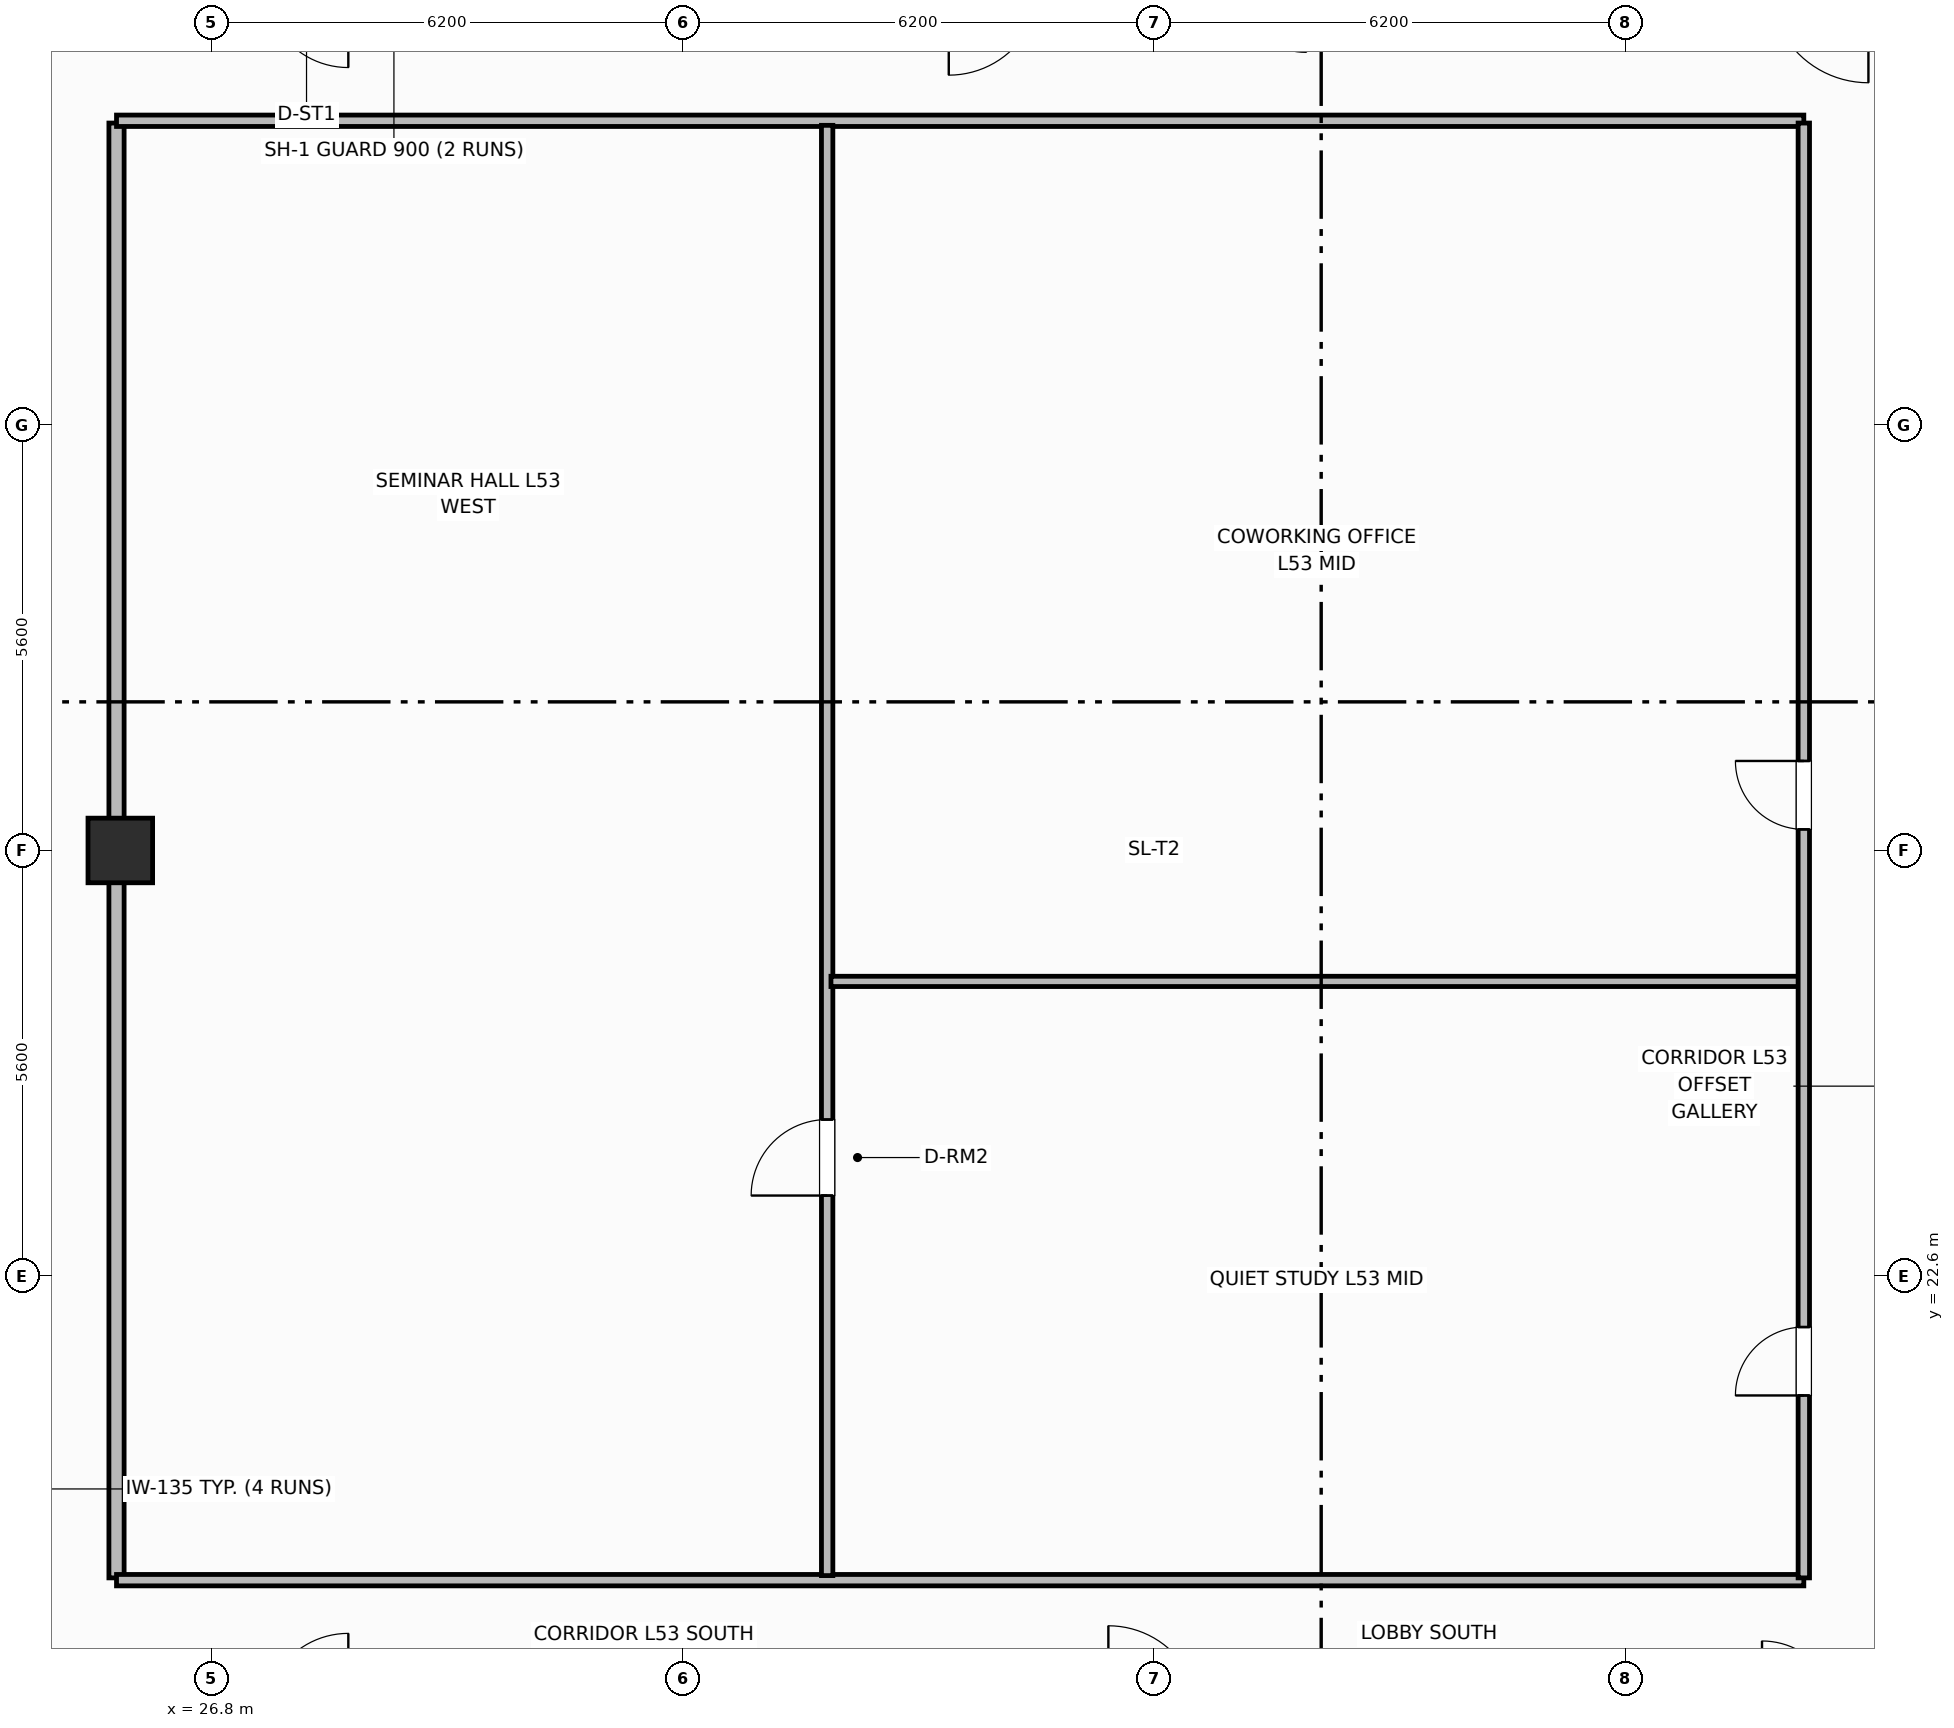
"""IFC4 building model, lengths in metres.
Left out: names, types, materials, properties, quantities, classifications, styles, units other than length and angle.
Written with IfcOpenShell. Run it as: python <this file> out.ifc"""

import sys

from ifc_helpers import new_model, si_unit, direction, frame, frame_2d, origin, origin_2d, place, context, subcontext, project, spatial, rectangle, extrude, element, fill, save


model = new_model("IFC4")
c1 = context("Model", 3, precision=1e-05, world=origin(), true_north=direction((0.0, 1.0)))
c2 = subcontext(c1, "Body", "Model", "MODEL_VIEW")
j1 = project(units=[si_unit("LENGTHUNIT", "METRE"), si_unit("PLANEANGLEUNIT", "RADIAN")], contexts=[c1])
p1 = place(None, origin())
s1 = spatial("IfcSite", under=j1, at=p1, CompositionType="ELEMENT")
p2 = place(p1, origin())
s2 = spatial("IfcBuilding", under=s1, at=p2, CompositionType="ELEMENT")
p3 = place(p2, frame((0.0, 0.0, 214.7)))
s3 = spatial("IfcBuildingStorey", under=s2, at=p3, CompositionType="ELEMENT", Elevation=214.7)
p4 = place(p3, frame((25.6, 28.2, 0.0), z_axis=(0.0, 0.0, 1.0), x_axis=(1.0, 0.0, 0.0)))
e1 = element("IfcColumn", 1, at=p4, inside=s3, PredefinedType="COLUMN", context=c2, shape_type="SweptSolid", body=[
    extrude(rectangle(XDim=0.85, YDim=0.85, at=origin_2d()), origin(), (0.0, 0.0, 1.0), 3.7),
])
p5 = place(p3, frame((25.55, 18.63, 0.0), z_axis=(0.0, 0.0, 1.0), x_axis=(0.0, 1.0, 0.0)))
e2 = element("IfcWall", 2, at=p5, inside=s3, PredefinedType="PARTITIONING", context=c2, shape_type="SweptSolid", body=[
    extrude(rectangle(XDim=19.14, YDim=0.2, at=frame_2d((9.57, 0.0))), origin(), (0.0, 0.0, 1.0), 2.55),
])
for number, where, z_axis, x_axis in (
    (3, (25.55, 18.6, 0.0), (0.0, 0.0, 1.0), (1.0, 0.0, 0.0)),
    (4, (25.55, 37.8, 0.0), (0.0, 0.0, 1.0), (1.0, 0.0, 0.0)),
):
    element("IfcWall", number, at=place(p3, frame(where, z_axis=z_axis, x_axis=x_axis)), inside=s3, PredefinedType="PARTITIONING", context=c2, shape_type="SweptSolid", body=[
        extrude(rectangle(XDim=22.2, YDim=0.15, at=frame_2d((11.1, 0.0))), origin(), (0.0, 0.0, 1.0), 2.55),
    ])
p6 = place(p3, frame((34.9, 18.66, 0.0), z_axis=(0.0, 0.0, 1.0), x_axis=(0.0, 1.0, 0.0)))
e5 = element("IfcWall", 5, at=p6, inside=s3, PredefinedType="PARTITIONING", context=c2, shape_type="SweptSolid", body=[
    extrude(rectangle(XDim=19.08, YDim=0.15, at=frame_2d((9.54, 0.0))), origin(), (0.0, 0.0, 1.0), 2.55),
])
p7 = place(p6, frame((5.0, 0.0, 0.0)))
e6 = element("IfcOpeningElement", 6, at=p7, cuts=e5, PredefinedType="OPENING", context=c2, shape_type="SweptSolid", body=[
    extrude(rectangle(XDim=1.0, YDim=2.15, at=frame_2d((0.5, 1.075))), frame((0.0, 0.085, 0.0), z_axis=(0.0, -1.0, 0.0), x_axis=(1.0, 0.0, 0.0)), (0.0, 0.0, 1.0), 0.17),
])
p8 = place(p3, frame((34.95, 26.477, 0.0), z_axis=(0.0, 0.0, 1.0), x_axis=(1.0, 0.0, 0.0)))
e7 = element("IfcWall", 7, at=p8, inside=s3, PredefinedType="PARTITIONING", context=c2, shape_type="SweptSolid", body=[
    extrude(rectangle(XDim=12.81, YDim=0.135, at=frame_2d((6.405, 0.0))), origin(), (0.0, 0.0, 1.0), 2.55),
])
p9 = place(p3, frame((47.75, 18.63, 0.0), z_axis=(0.0, 0.0, 1.0), x_axis=(0.0, 1.0, 0.0)))
e8 = element("IfcWall", 8, at=p9, inside=s3, PredefinedType="PARTITIONING", context=c2, shape_type="SweptSolid", body=[
    extrude(rectangle(XDim=19.14, YDim=0.15, at=frame_2d((9.57, 0.0))), origin(), (0.0, 0.0, 1.0), 2.55),
])
p10 = place(p9, frame((2.4, 0.0, 0.0)))
e9 = element("IfcOpeningElement", 9, at=p10, cuts=e8, PredefinedType="OPENING", context=c2, shape_type="SweptSolid", body=[
    extrude(rectangle(XDim=0.9, YDim=2.1, at=frame_2d((0.45, 1.05))), frame((0.0, 0.085, 0.0), z_axis=(0.0, -1.0, 0.0), x_axis=(1.0, 0.0, 0.0)), (0.0, 0.0, 1.0), 0.17),
])
p11 = place(p9, frame((9.847, 0.0, 0.0)))
e10 = element("IfcOpeningElement", 10, at=p11, cuts=e8, PredefinedType="OPENING", context=c2, shape_type="SweptSolid", body=[
    extrude(rectangle(XDim=0.9, YDim=2.1, at=frame_2d((0.45, 1.05))), frame((0.0, 0.085, 0.0), z_axis=(0.0, -1.0, 0.0), x_axis=(1.0, 0.0, 0.0)), (0.0, 0.0, 1.0), 0.17),
])
p12 = place(p7, origin())
e11 = element("IfcDoor", 11, at=p12, inside=s3, OperationType="SINGLE_SWING_LEFT", PredefinedType="DOOR", context=c2, shape_type="SweptSolid", body=[
    extrude(rectangle(XDim=1.0, YDim=2.15, at=frame_2d((0.5, 1.075))), frame((0.0, 0.025, 0.0), z_axis=(0.0, -1.0, 0.0), x_axis=(1.0, 0.0, 0.0)), (0.0, 0.0, 1.0), 0.05),
])
fill(e6, e11)
p13 = place(p10, origin())
e12 = element("IfcDoor", 12, at=p13, inside=s3, OperationType="SINGLE_SWING_LEFT", PredefinedType="DOOR", context=c2, shape_type="SweptSolid", body=[
    extrude(rectangle(XDim=0.9, YDim=2.1, at=frame_2d((0.45, 1.05))), frame((0.0, 0.025, 0.0), z_axis=(0.0, -1.0, 0.0), x_axis=(1.0, 0.0, 0.0)), (0.0, 0.0, 1.0), 0.05),
])
fill(e9, e12)
p14 = place(p11, origin())
e13 = element("IfcDoor", 13, at=p14, inside=s3, OperationType="SINGLE_SWING_RIGHT", PredefinedType="DOOR", context=c2, shape_type="SweptSolid", body=[
    extrude(rectangle(XDim=0.9, YDim=2.1, at=frame_2d((0.45, 1.05))), frame((0.0, 0.025, 0.0), z_axis=(0.0, -1.0, 0.0), x_axis=(1.0, 0.0, 0.0)), (0.0, 0.0, 1.0), 0.05),
])
fill(e10, e13)
save(model, sys.argv[1])
